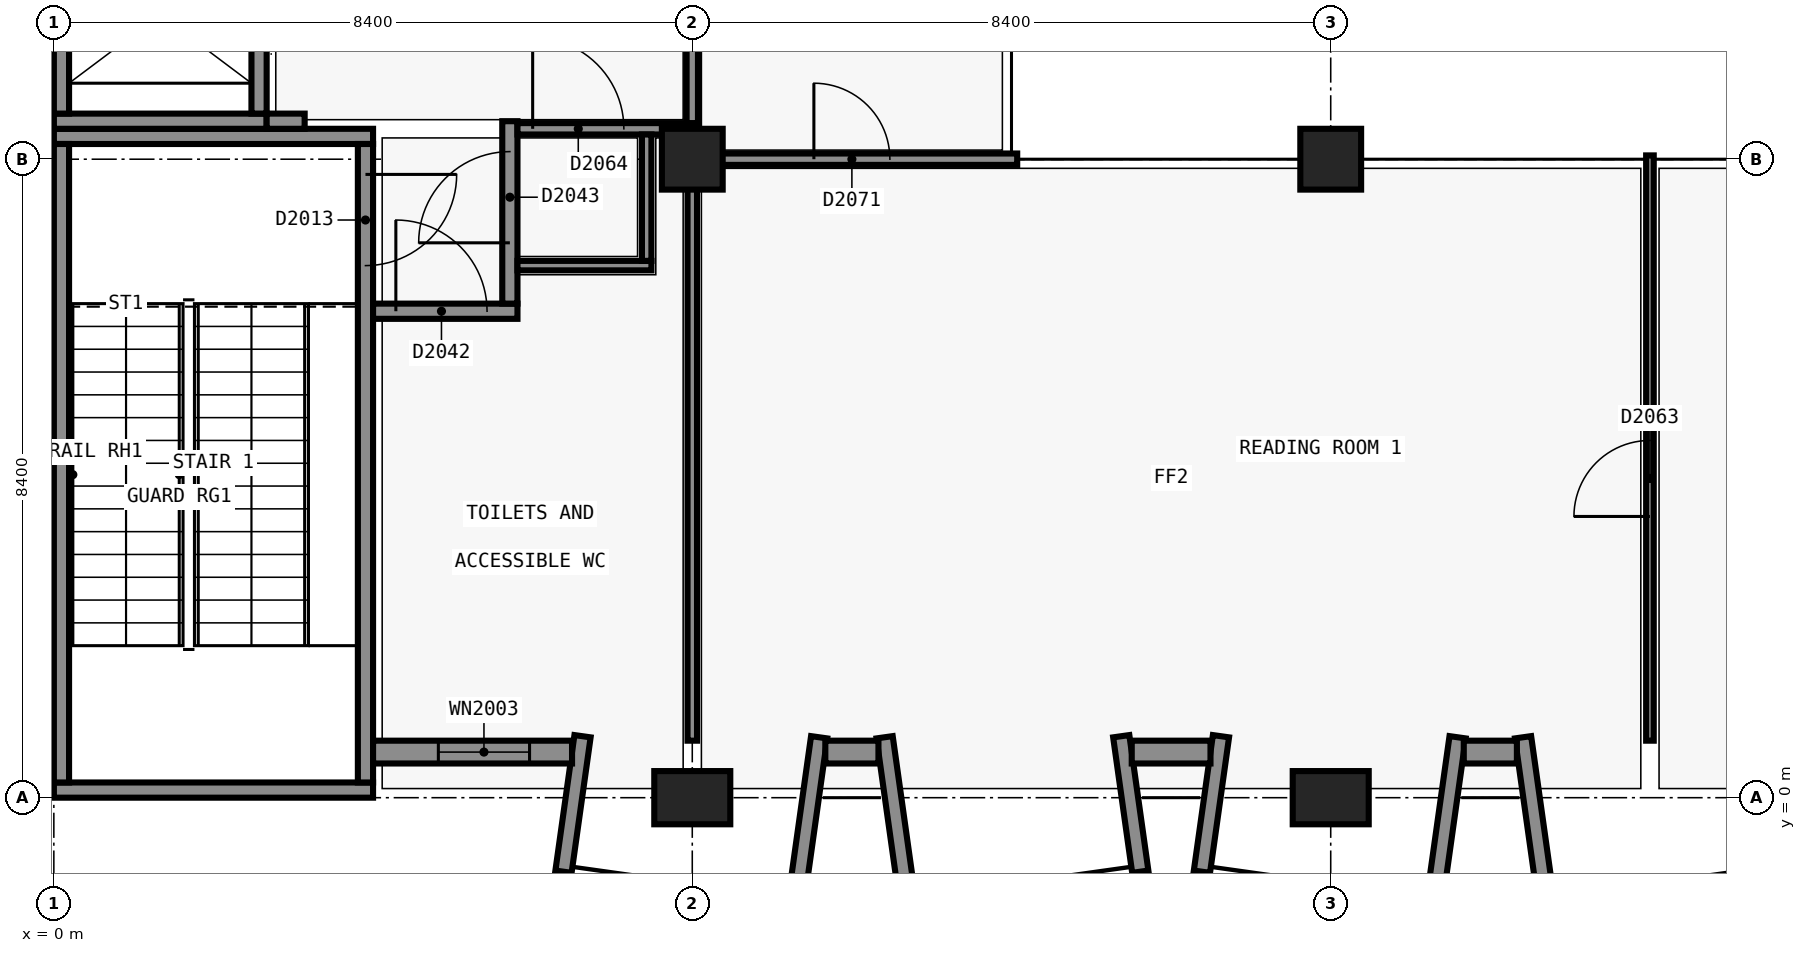
"""IFC4 building model, lengths in metres.
Left out: names, types, materials, properties, quantities, classifications, styles, units other than length and angle.
Written with IfcOpenShell. Run it as: python <this file> out.ifc"""

import sys

from ifc_helpers import new_model, si_unit, direction, frame, frame_2d, origin, origin_2d, place, context, subcontext, project, spatial, rectangle, extrude, element, fill, save


model = new_model("IFC4")
c1 = context("Model", 3, precision=1e-05, world=origin(), true_north=direction((0.0, 1.0)))
c2 = subcontext(c1, "Body", "Model", "MODEL_VIEW")
j1 = project(units=[si_unit("LENGTHUNIT", "METRE"), si_unit("PLANEANGLEUNIT", "RADIAN")], contexts=[c1])
p1 = place(None, origin())
s1 = spatial("IfcSite", under=j1, at=p1, CompositionType="ELEMENT")
p2 = place(p1, origin())
s2 = spatial("IfcBuilding", under=s1, at=p2, CompositionType="ELEMENT")
p3 = place(p2, frame((0.0, 0.0, 10.2)))
s3 = spatial("IfcBuildingStorey", under=s2, at=p3, CompositionType="ELEMENT", Elevation=10.2)
for number, where, z_axis, x_axis in (
    (1, (4.2, 0.1, 0.0), (0.0, 0.0, 1.0), (-1.0, 0.0, 0.0)),
    (2, (0.0, 8.7, 0.0), (0.0, 0.0, 1.0), (1.0, 0.0, 0.0)),
):
    element("IfcWall", number, at=place(p3, frame(where, z_axis=z_axis, x_axis=x_axis)), inside=s3, PredefinedType="SHEAR", context=c2, shape_type="SweptSolid", body=[
        extrude(rectangle(XDim=4.199, YDim=0.2, at=frame_2d((2.1, 0.0))), origin(), (0.0, 0.0, 1.0), 4.8),
    ])
p4 = place(p3, frame((0.1, 0.2, 0.0), z_axis=(0.0, 0.0, 1.0), x_axis=(0.0, 1.0, 0.0)))
e3 = element("IfcWall", 3, at=p4, inside=s3, PredefinedType="SHEAR", context=c2, shape_type="SweptSolid", body=[
    extrude(rectangle(XDim=8.4, YDim=0.2, at=frame_2d((4.2, 0.0))), origin(), (0.0, 0.0, 1.0), 4.8),
])
p5 = place(p3, frame((4.1, 8.6, 0.0), z_axis=(0.0, 0.0, 1.0), x_axis=(0.0, -1.0, 0.0)))
e4 = element("IfcWall", 4, at=p5, inside=s3, PredefinedType="SHEAR", context=c2, shape_type="SweptSolid", body=[
    extrude(rectangle(XDim=8.4, YDim=0.2, at=frame_2d((4.2, 0.0))), origin(), (0.0, 0.0, 1.0), 4.8),
])
p6 = place(p5, frame((0.4, 0.0, 0.0)))
e5 = element("IfcOpeningElement", 5, at=p6, cuts=e4, PredefinedType="OPENING", context=c2, shape_type="SweptSolid", body=[
    extrude(rectangle(XDim=1.2, YDim=2.1, at=frame_2d((0.6, 1.05))), frame((0.0, 0.11, 0.0), z_axis=(0.0, -1.0, 0.0), x_axis=(1.0, 0.0, 0.0)), (0.0, 0.0, 1.0), 0.22),
])
p7 = place(p3, frame((2.8, 8.9, 0.0), z_axis=(0.0, 0.0, 1.0), x_axis=(-1.0, 0.0, 0.0)))
e6 = element("IfcWall", 6, at=p7, inside=s3, PredefinedType="SHEAR", context=c2, shape_type="SweptSolid", body=[
    extrude(rectangle(XDim=2.8, YDim=0.2, at=frame_2d((1.4, 0.0))), origin(), (0.0, 0.0, 1.0), 4.8),
])
p8 = place(p3, frame((0.1, 9.0, 0.0), z_axis=(0.0, 0.0, 1.0), x_axis=(0.0, 1.0, 0.0)))
e7 = element("IfcWall", 7, at=p8, inside=s3, PredefinedType="SHEAR", context=c2, shape_type="SweptSolid", body=[
    extrude(rectangle(XDim=2.7, YDim=0.2, at=frame_2d((1.35, 0.0))), origin(), (0.0, 0.0, 1.0), 4.8),
])
p9 = place(p3, frame((2.7, 11.7, 0.0), z_axis=(0.0, 0.0, 1.0), x_axis=(0.0, -1.0, 0.0)))
e8 = element("IfcWall", 8, at=p9, inside=s3, PredefinedType="SHEAR", context=c2, shape_type="SweptSolid", body=[
    extrude(rectangle(XDim=2.7, YDim=0.2, at=frame_2d((1.35, 0.0))), origin(), (0.0, 0.0, 1.0), 4.8),
])
p10 = place(p9, frame((0.85, 0.0, 0.0)))
e9 = element("IfcOpeningElement", 9, at=p10, cuts=e8, PredefinedType="OPENING", context=c2, shape_type="SweptSolid", body=[
    extrude(rectangle(XDim=1.1, YDim=2.1, at=frame_2d((0.55, 1.05))), frame((0.0, 0.11, 0.0), z_axis=(0.0, -1.0, 0.0), x_axis=(1.0, 0.0, 0.0)), (0.0, 0.0, 1.0), 0.22),
])
p11 = place(p3, frame((8.4, 0.0, 0.0), z_axis=(0.0, 0.0, 1.0), x_axis=(1.0, 0.0, 0.0)))
e10 = element("IfcColumn", 10, at=p11, inside=s3, PredefinedType="COLUMN", context=c2, shape_type="SweptSolid", body=[
    extrude(rectangle(XDim=1.0, YDim=0.7, at=origin_2d()), origin(), (0.0, 0.0, 1.0), 4.8),
])
p12 = place(p3, frame((8.4, 8.4, 0.0), z_axis=(0.0, 0.0, 1.0), x_axis=(1.0, 0.0, 0.0)))
e11 = element("IfcColumn", 11, at=p12, inside=s3, PredefinedType="COLUMN", context=c2, shape_type="SweptSolid", body=[
    extrude(rectangle(XDim=0.8, YDim=0.8, at=origin_2d()), origin(), (0.0, 0.0, 1.0), 4.8),
])
p13 = place(p3, frame((16.8, 0.0, 0.0), z_axis=(0.0, 0.0, 1.0), x_axis=(1.0, 0.0, 0.0)))
e12 = element("IfcColumn", 12, at=p13, inside=s3, PredefinedType="COLUMN", context=c2, shape_type="SweptSolid", body=[
    extrude(rectangle(XDim=1.0, YDim=0.7, at=origin_2d()), origin(), (0.0, 0.0, 1.0), 4.8),
])
p14 = place(p3, frame((16.8, 8.4, 0.0), z_axis=(0.0, 0.0, 1.0), x_axis=(1.0, 0.0, 0.0)))
e13 = element("IfcColumn", 13, at=p14, inside=s3, PredefinedType="COLUMN", context=c2, shape_type="SweptSolid", body=[
    extrude(rectangle(XDim=0.8, YDim=0.8, at=origin_2d()), origin(), (0.0, 0.0, 1.0), 4.8),
])
p15 = place(p3, frame((3.3, 8.9, 0.0), z_axis=(0.0, 0.0, 1.0), x_axis=(-1.0, 0.0, 0.0)))
e14 = element("IfcWall", 14, at=p15, inside=s3, PredefinedType="SHEAR", context=c2, shape_type="SweptSolid", body=[
    extrude(rectangle(XDim=0.5, YDim=0.2, at=frame_2d((0.25, 0.0))), origin(), (0.0, 0.0, 1.0), 4.8),
])
p16 = place(p3, frame((6.956, 0.809, 0.0), z_axis=(0.0, 0.0, 1.0), x_axis=(-0.139161311926, -0.990269725511, 0.0)))
e15 = element("IfcWall", 15, at=p16, inside=s3, PredefinedType="SOLIDWALL", context=c2, shape_type="SweptSolid", body=[
    extrude(rectangle(XDim=1.8, YDim=0.215, at=frame_2d((0.9, 0.0))), origin(), (0.0, 0.0, 1.0), 4.5),
])
for number, where, z_axis, x_axis in (
    (16, (10.069, 0.795, 0.0), (0.0, 0.0, 1.0), (-0.139, -0.99, 0.0)),
    (17, (10.931, 0.795, 0.0), (0.0, 0.0, 1.0), (0.139, -0.99, 0.0)),
):
    element("IfcWall", number, at=place(p3, frame(where, z_axis=z_axis, x_axis=x_axis)), inside=s3, PredefinedType="SOLIDWALL", context=c2, shape_type="SweptSolid", body=[
        extrude(rectangle(XDim=2.219, YDim=0.215, at=frame_2d((1.11, 0.0))), origin(), (0.0, 0.0, 1.0), 4.5),
    ])
for number, where, z_axis, x_axis in (
    (18, (14.044, 0.809, 0.0), (0.0, 0.0, 1.0), (0.139, -0.99, 0.0)),
    (19, (15.356, 0.809, 0.0), (0.0, 0.0, 1.0), (-0.139, -0.99, 0.0)),
):
    element("IfcWall", number, at=place(p3, frame(where, z_axis=z_axis, x_axis=x_axis)), inside=s3, PredefinedType="SOLIDWALL", context=c2, shape_type="SweptSolid", body=[
        extrude(rectangle(XDim=1.8, YDim=0.215, at=frame_2d((0.9, 0.0))), origin(), (0.0, 0.0, 1.0), 4.5),
    ])
p17 = place(p3, frame((18.469, 0.795, 0.0), z_axis=(0.0, 0.0, 1.0), x_axis=(-0.139249775508, -0.99025728981, 0.0)))
e20 = element("IfcWall", 20, at=p17, inside=s3, PredefinedType="SOLIDWALL", context=c2, shape_type="SweptSolid", body=[
    extrude(rectangle(XDim=2.22, YDim=0.215, at=frame_2d((1.11, 0.0))), origin(), (0.0, 0.0, 1.0), 4.5),
])
p18 = place(p3, frame((19.331, 0.795, 0.0), z_axis=(0.0, 0.0, 1.0), x_axis=(0.139141913905, -0.990272451295, 0.0)))
e21 = element("IfcWall", 21, at=p18, inside=s3, PredefinedType="SOLIDWALL", context=c2, shape_type="SweptSolid", body=[
    extrude(rectangle(XDim=2.219, YDim=0.215, at=frame_2d((1.11, 0.0))), origin(), (0.0, 0.0, 1.0), 4.5),
])
p19 = place(p3, frame((6.818, 0.6, 0.0), z_axis=(0.0, 0.0, 1.0), x_axis=(-1.0, 0.0, 0.0)))
e22 = element("IfcWall", 22, at=p19, inside=s3, PredefinedType="SOLIDWALL", context=c2, shape_type="SweptSolid", body=[
    extrude(rectangle(XDim=2.618, YDim=0.3, at=frame_2d((1.309, 0.0))), origin(), (0.0, 0.0, 1.0), 4.5),
])
p20 = place(p19, frame((0.559, 0.0, 0.9)))
e23 = element("IfcOpeningElement", 23, at=p20, cuts=e22, PredefinedType="OPENING", context=c2, shape_type="SweptSolid", body=[
    extrude(rectangle(XDim=1.2, YDim=1.5, at=frame_2d((0.6, 0.75))), frame((0.0, 0.16, 0.0), z_axis=(0.0, -1.0, 0.0), x_axis=(1.0, 0.0, 0.0)), (0.0, 0.0, 1.0), 0.32),
])
p21 = place(p3, frame((10.85, 0.6, 0.0), z_axis=(0.0, 0.0, 1.0), x_axis=(-1.0, 0.0, 0.0)))
e24 = element("IfcWall", 24, at=p21, inside=s3, PredefinedType="SOLIDWALL", context=c2, shape_type="SweptSolid", body=[
    extrude(rectangle(XDim=0.699, YDim=0.3, at=frame_2d((0.35, 0.0))), origin(), (0.0, 0.0, 1.0), 4.5),
])
p22 = place(p3, frame((15.218, 0.6, 0.0), z_axis=(0.0, 0.0, 1.0), x_axis=(-1.0, 0.0, 0.0)))
e25 = element("IfcWall", 25, at=p22, inside=s3, PredefinedType="SOLIDWALL", context=c2, shape_type="SweptSolid", body=[
    extrude(rectangle(XDim=1.036, YDim=0.3, at=frame_2d((0.518, 0.0))), origin(), (0.0, 0.0, 1.0), 4.5),
])
p23 = place(p3, frame((19.25, 0.6, 0.0), z_axis=(0.0, 0.0, 1.0), x_axis=(-1.0, 0.0, 0.0)))
e26 = element("IfcWall", 26, at=p23, inside=s3, PredefinedType="SOLIDWALL", context=c2, shape_type="SweptSolid", body=[
    extrude(rectangle(XDim=0.699, YDim=0.3, at=frame_2d((0.35, 0.0))), origin(), (0.0, 0.0, 1.0), 4.5),
])
p24 = place(p3, frame((4.2, 6.4, 0.0), z_axis=(0.0, 0.0, 1.0), x_axis=(1.0, 0.0, 0.0)))
e27 = element("IfcWall", 27, at=p24, inside=s3, PredefinedType="SOLIDWALL", context=c2, shape_type="SweptSolid", body=[
    extrude(rectangle(XDim=1.9, YDim=0.2, at=frame_2d((0.95, 0.0))), origin(), (0.0, 0.0, 1.0), 4.5),
])
p25 = place(p24, frame((0.3, 0.0, 0.0)))
e28 = element("IfcOpeningElement", 28, at=p25, cuts=e27, PredefinedType="OPENING", context=c2, shape_type="SweptSolid", body=[
    extrude(rectangle(XDim=1.2, YDim=2.1, at=frame_2d((0.6, 1.05))), frame((0.0, 0.11, 0.0), z_axis=(0.0, -1.0, 0.0), x_axis=(1.0, 0.0, 0.0)), (0.0, 0.0, 1.0), 0.22),
])
p26 = place(p3, frame((6.0, 6.5, 0.0), z_axis=(0.0, 0.0, 1.0), x_axis=(0.0, 1.0, 0.0)))
e29 = element("IfcWall", 29, at=p26, inside=s3, PredefinedType="SOLIDWALL", context=c2, shape_type="SweptSolid", body=[
    extrude(rectangle(XDim=2.4, YDim=0.2, at=frame_2d((1.2, 0.0))), origin(), (0.0, 0.0, 1.0), 4.0),
])
p27 = place(p26, frame((0.8, 0.0, 0.0)))
e30 = element("IfcOpeningElement", 30, at=p27, cuts=e29, PredefinedType="OPENING", context=c2, shape_type="SweptSolid", body=[
    extrude(rectangle(XDim=1.2, YDim=2.1, at=frame_2d((0.6, 1.05))), frame((0.0, 0.11, 0.0), z_axis=(0.0, -1.0, 0.0), x_axis=(1.0, 0.0, 0.0)), (0.0, 0.0, 1.0), 0.22),
])
p28 = place(p3, frame((8.325, 8.4, 0.0), z_axis=(0.0, 0.0, 1.0), x_axis=(1.0, 0.0, 0.0)))
e31 = element("IfcWall", 31, at=p28, inside=s3, PredefinedType="PARTITIONING", context=c2, shape_type="SweptSolid", body=[
    extrude(rectangle(XDim=4.35, YDim=0.15, at=frame_2d((2.175, 0.0))), origin(), (0.0, 0.0, 1.0), 3.8),
])
p29 = place(p28, frame((1.675, 0.0, 0.0)))
e32 = element("IfcOpeningElement", 32, at=p29, cuts=e31, PredefinedType="OPENING", context=c2, shape_type="SweptSolid", body=[
    extrude(rectangle(XDim=1.0, YDim=2.1, at=frame_2d((0.5, 1.05))), frame((0.0, 0.085, 0.0), z_axis=(0.0, -1.0, 0.0), x_axis=(1.0, 0.0, 0.0)), (0.0, 0.0, 1.0), 0.17),
])
p30 = place(p3, frame((6.1, 8.8, 0.0), z_axis=(0.0, 0.0, 1.0), x_axis=(1.0, 0.0, 0.0)))
e33 = element("IfcWall", 33, at=p30, inside=s3, PredefinedType="SOLIDWALL", context=c2, shape_type="SweptSolid", body=[
    extrude(rectangle(XDim=2.375, YDim=0.15, at=frame_2d((1.188, 0.0))), origin(), (0.0, 0.0, 1.0), 3.8),
])
p31 = place(p30, frame((0.2, 0.0, 0.0)))
e34 = element("IfcOpeningElement", 34, at=p31, cuts=e33, PredefinedType="OPENING", context=c2, shape_type="SweptSolid", body=[
    extrude(rectangle(XDim=1.2, YDim=2.1, at=frame_2d((0.6, 1.05))), frame((0.0, 0.085, 0.0), z_axis=(0.0, -1.0, 0.0), x_axis=(1.0, 0.0, 0.0)), (0.0, 0.0, 1.0), 0.17),
])
p32 = place(p3, frame((8.4, 8.475, 0.0), z_axis=(0.0, 0.0, 1.0), x_axis=(0.0, 1.0, 0.0)))
e35 = element("IfcWall", 35, at=p32, inside=s3, PredefinedType="PARTITIONING", context=c2, shape_type="SweptSolid", body=[
    extrude(rectangle(XDim=0.25, YDim=0.15, at=frame_2d((0.125, 0.0))), origin(), (0.0, 0.0, 1.0), 3.8),
])
p33 = place(p3, frame((8.4, 8.875, 0.0), z_axis=(0.0, 0.0, 1.0), x_axis=(0.0, 1.0, 0.0)))
e36 = element("IfcWall", 36, at=p33, inside=s3, PredefinedType="SOLIDWALL", context=c2, shape_type="SweptSolid", body=[
    extrude(rectangle(XDim=2.85, YDim=0.15, at=frame_2d((1.425, 0.0))), origin(), (0.0, 0.0, 1.0), 3.8),
])
p34 = place(p3, frame((6.1, 7.0, 0.0), z_axis=(0.0, 0.0, 1.0), x_axis=(1.0, 0.0, 0.0)))
e37 = element("IfcWall", 37, at=p34, inside=s3, PredefinedType="PARTITIONING", context=c2, shape_type="SweptSolid", body=[
    extrude(rectangle(XDim=1.762, YDim=0.125, at=frame_2d((0.881, 0.0))), origin(), (0.0, 0.0, 1.0), 4.5),
])
p35 = place(p3, frame((7.8, 7.062, 0.0), z_axis=(0.0, 0.0, 1.0), x_axis=(0.0, 1.0, 0.0)))
e38 = element("IfcWall", 38, at=p35, inside=s3, PredefinedType="PARTITIONING", context=c2, shape_type="SweptSolid", body=[
    extrude(rectangle(XDim=1.663, YDim=0.125, at=frame_2d((0.831, 0.0))), origin(), (0.0, 0.0, 1.0), 4.0),
])
p36 = place(p3, frame((8.4, 0.75, 0.0), z_axis=(0.0, 0.0, 1.0), x_axis=(0.0, 1.0, 0.0)))
e39 = element("IfcWall", 39, at=p36, inside=s3, PredefinedType="PARTITIONING", context=c2, shape_type="SweptSolid", body=[
    extrude(rectangle(XDim=7.575, YDim=0.125, at=frame_2d((3.788, 0.0))), origin(), (0.0, 0.0, 1.0), 3.8),
])
p37 = place(p3, frame((21.0, 0.75, 0.0), z_axis=(0.0, 0.0, 1.0), x_axis=(0.0, 1.0, 0.0)))
e40 = element("IfcWall", 40, at=p37, inside=s3, PredefinedType="PARTITIONING", context=c2, shape_type="SweptSolid", body=[
    extrude(rectangle(XDim=7.7, YDim=0.1, at=frame_2d((3.85, 0.0))), origin(), (0.0, 0.0, 1.0), 3.8),
])
p38 = place(p37, frame((2.95, 0.0, 0.0)))
e41 = element("IfcOpeningElement", 41, at=p38, cuts=e40, PredefinedType="OPENING", context=c2, shape_type="SweptSolid", body=[
    extrude(rectangle(XDim=1.0, YDim=2.1, at=frame_2d((0.5, 1.05))), frame((0.0, 0.06, 0.0), z_axis=(0.0, -1.0, 0.0), x_axis=(1.0, 0.0, 0.0)), (0.0, 0.0, 1.0), 0.12),
])
p39 = place(p20, origin())
e42 = element("IfcWindow", 42, at=p39, inside=s3, PartitioningType="SINGLE_PANEL", PredefinedType="WINDOW", context=c2, shape_type="SweptSolid", body=[
    extrude(rectangle(XDim=1.2, YDim=1.5, at=frame_2d((0.6, 0.75))), frame((0.0, 0.03, 0.0), z_axis=(0.0, -1.0, 0.0), x_axis=(1.0, 0.0, 0.0)), (0.0, 0.0, 1.0), 0.06),
])
fill(e23, e42)
p40 = place(p10, origin())
e43 = element("IfcDoor", 43, at=p40, inside=s3, OperationType="SLIDING_TO_LEFT", PredefinedType="DOOR", context=c2, shape_type="SweptSolid", body=[
    extrude(rectangle(XDim=1.1, YDim=2.1, at=frame_2d((0.55, 1.05))), frame((0.0, 0.025, 0.0), z_axis=(0.0, -1.0, 0.0), x_axis=(1.0, 0.0, 0.0)), (0.0, 0.0, 1.0), 0.05),
])
fill(e9, e43)
p41 = place(p6, origin())
e44 = element("IfcDoor", 44, at=p41, inside=s3, OperationType="SINGLE_SWING_RIGHT", PredefinedType="DOOR", context=c2, shape_type="SweptSolid", body=[
    extrude(rectangle(XDim=1.2, YDim=2.1, at=frame_2d((0.6, 1.05))), frame((0.0, 0.025, 0.0), z_axis=(0.0, -1.0, 0.0), x_axis=(1.0, 0.0, 0.0)), (0.0, 0.0, 1.0), 0.05),
])
fill(e5, e44)
p42 = place(p25, origin())
e45 = element("IfcDoor", 45, at=p42, inside=s3, OperationType="SINGLE_SWING_LEFT", PredefinedType="DOOR", context=c2, shape_type="SweptSolid", body=[
    extrude(rectangle(XDim=1.2, YDim=2.1, at=frame_2d((0.6, 1.05))), frame((0.0, 0.025, 0.0), z_axis=(0.0, -1.0, 0.0), x_axis=(1.0, 0.0, 0.0)), (0.0, 0.0, 1.0), 0.05),
])
fill(e28, e45)
p43 = place(p27, origin())
e46 = element("IfcDoor", 46, at=p43, inside=s3, OperationType="SINGLE_SWING_RIGHT", PredefinedType="DOOR", context=c2, shape_type="SweptSolid", body=[
    extrude(rectangle(XDim=1.2, YDim=2.1, at=frame_2d((0.6, 1.05))), frame((0.0, 0.025, 0.0), z_axis=(0.0, -1.0, 0.0), x_axis=(1.0, 0.0, 0.0)), (0.0, 0.0, 1.0), 0.05),
])
fill(e30, e46)
p44 = place(p38, origin())
e47 = element("IfcDoor", 47, at=p44, inside=s3, OperationType="SINGLE_SWING_RIGHT", PredefinedType="DOOR", context=c2, shape_type="SweptSolid", body=[
    extrude(rectangle(XDim=1.0, YDim=2.1, at=frame_2d((0.5, 1.05))), frame((0.0, 0.025, 0.0), z_axis=(0.0, -1.0, 0.0), x_axis=(1.0, 0.0, 0.0)), (0.0, 0.0, 1.0), 0.05),
])
fill(e41, e47)
p45 = place(p31, origin())
e48 = element("IfcDoor", 48, at=p45, inside=s3, OperationType="SINGLE_SWING_RIGHT", PredefinedType="DOOR", context=c2, shape_type="SweptSolid", body=[
    extrude(rectangle(XDim=1.2, YDim=2.1, at=frame_2d((0.6, 1.05))), frame((0.0, 0.025, 0.0), z_axis=(0.0, -1.0, 0.0), x_axis=(1.0, 0.0, 0.0)), (0.0, 0.0, 1.0), 0.05),
])
fill(e34, e48)
p46 = place(p29, origin())
e49 = element("IfcDoor", 49, at=p46, inside=s3, OperationType="SINGLE_SWING_RIGHT", PredefinedType="DOOR", context=c2, shape_type="SweptSolid", body=[
    extrude(rectangle(XDim=1.0, YDim=2.1, at=frame_2d((0.5, 1.05))), frame((0.0, 0.025, 0.0), z_axis=(0.0, -1.0, 0.0), x_axis=(1.0, 0.0, 0.0)), (0.0, 0.0, 1.0), 0.05),
])
fill(e32, e49)
save(model, sys.argv[1])
